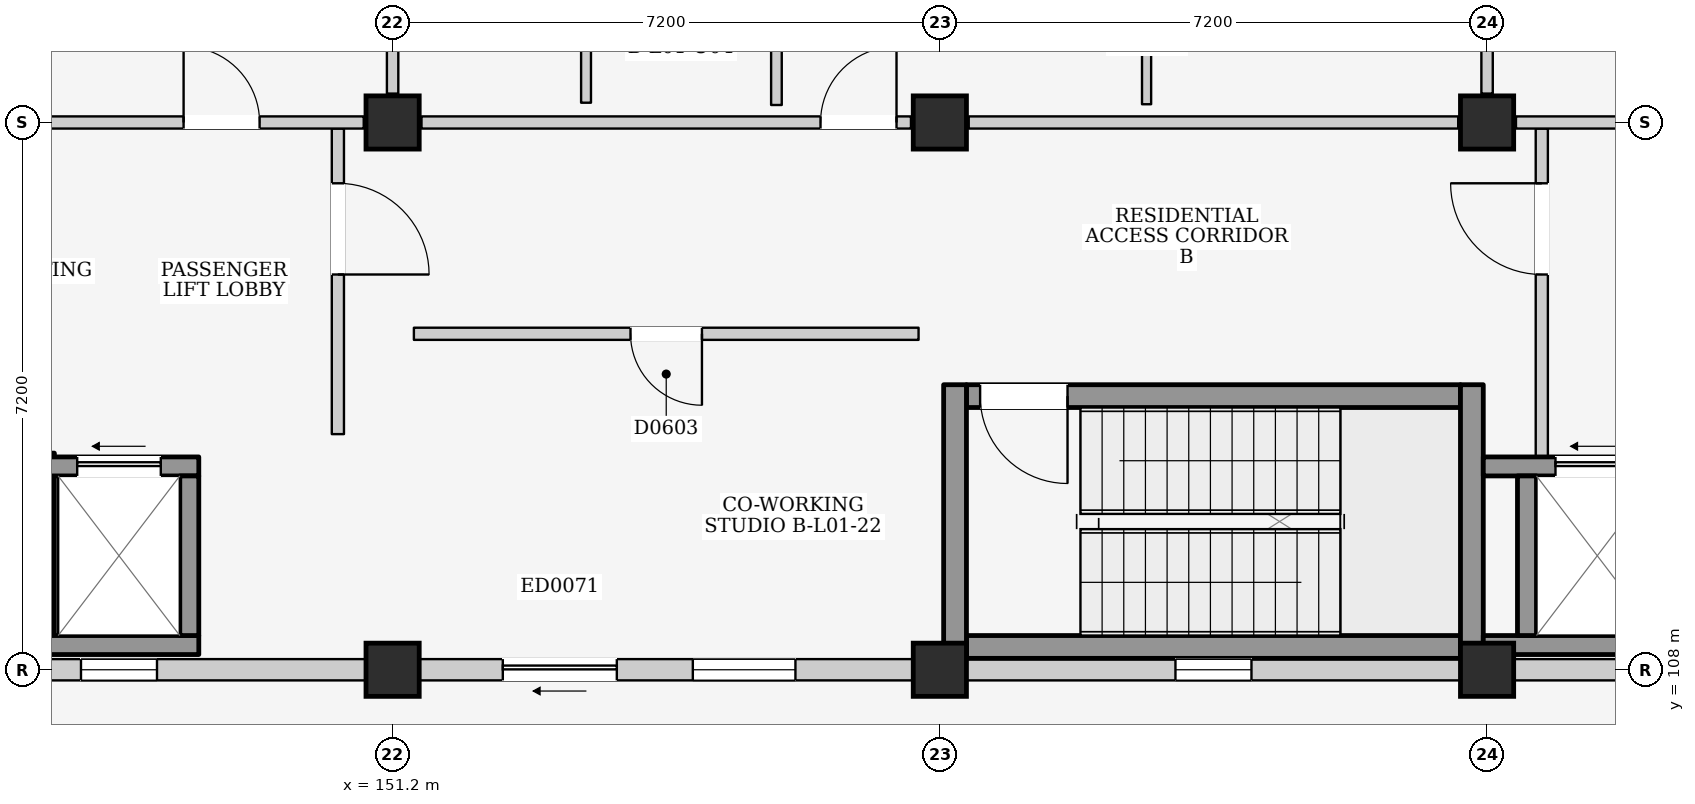
"""IFC4 building model, lengths in metres.
Left out: names, types, materials, properties, quantities, classifications, styles, units other than length and angle.
Written with IfcOpenShell. Run it as: python <this file> out.ifc"""

import sys

from ifc_helpers import new_model, si_unit, direction, frame, frame_2d, origin, origin_2d, place, context, subcontext, project, spatial, rectangle, extrude, element, fill, save


model = new_model("IFC4")
c1 = context("Model", 3, precision=1e-05, world=origin(), true_north=direction((0.0, 1.0)))
c2 = subcontext(c1, "Body", "Model", "MODEL_VIEW")
j1 = project(units=[si_unit("LENGTHUNIT", "METRE"), si_unit("PLANEANGLEUNIT", "RADIAN")], contexts=[c1])
p1 = place(None, origin())
s1 = spatial("IfcSite", under=j1, at=p1, CompositionType="ELEMENT")
p2 = place(p1, origin())
s2 = spatial("IfcBuilding", under=s1, at=p2, CompositionType="ELEMENT")
p3 = place(p2, frame((0.0, 0.0, 4.5)))
s3 = spatial("IfcBuildingStorey", under=s2, at=p3, CompositionType="ELEMENT", Elevation=4.5)
for number, where, z_axis, x_axis in (
    (1, (151.2, 108.0, 0.0), (0.0, 0.0, 1.0), (1.0, 0.0, 0.0)),
    (2, (151.2, 115.2, 0.0), (0.0, 0.0, 1.0), (1.0, 0.0, 0.0)),
    (3, (158.4, 108.0, 0.0), (0.0, 0.0, 1.0), (1.0, 0.0, 0.0)),
    (4, (158.4, 115.2, 0.0), (0.0, 0.0, 1.0), (1.0, 0.0, 0.0)),
    (5, (165.6, 108.0, 0.0), (0.0, 0.0, 1.0), (1.0, 0.0, 0.0)),
    (6, (165.6, 115.2, 0.0), (0.0, 0.0, 1.0), (1.0, 0.0, 0.0)),
):
    element("IfcColumn", number, at=place(p3, frame(where, z_axis=z_axis, x_axis=x_axis)), inside=s3, PredefinedType="COLUMN", context=c2, shape_type="SweptSolid", body=[
        extrude(rectangle(XDim=0.7, YDim=0.7, at=origin_2d()), origin(), (0.0, 0.0, 1.0), 4.5),
    ])
p4 = place(p3, frame((144.35, 108.0, 0.0), z_axis=(0.0, 0.0, 1.0), x_axis=(1.0, 0.0, 0.0)))
e7 = element("IfcWall", 7, at=p4, inside=s3, PredefinedType="ELEMENTEDWALL", context=c2, shape_type="SweptSolid", body=[
    extrude(rectangle(XDim=6.5, YDim=0.28, at=frame_2d((3.25, 0.0))), origin(), (0.0, 0.0, 1.0), 3.635),
])
p5 = place(p4, frame((2.75, 0.0, 1.2)))
e8 = element("IfcOpeningElement", 8, at=p5, cuts=e7, PredefinedType="OPENING", context=c2, shape_type="SweptSolid", body=[
    extrude(rectangle(XDim=1.0, YDim=0.9, at=frame_2d((0.5, 0.45))), frame((0.0, 0.155, 0.0), z_axis=(0.0, -1.0, 0.0), x_axis=(1.0, 0.0, 0.0)), (0.0, 0.0, 1.0), 0.31),
])
p6 = place(p3, frame((151.55, 108.0, 0.0), z_axis=(0.0, 0.0, 1.0), x_axis=(1.0, 0.0, 0.0)))
e9 = element("IfcWall", 9, at=p6, inside=s3, PredefinedType="ELEMENTEDWALL", context=c2, shape_type="SweptSolid", body=[
    extrude(rectangle(XDim=6.5, YDim=0.28, at=frame_2d((3.25, 0.0))), origin(), (0.0, 0.0, 1.0), 3.635),
])
p7 = place(p6, frame((1.1, 0.0, 0.0)))
e10 = element("IfcOpeningElement", 10, at=p7, cuts=e9, PredefinedType="OPENING", context=c2, shape_type="SweptSolid", body=[
    extrude(rectangle(XDim=1.5, YDim=2.12, at=frame_2d((0.75, 1.06))), frame((0.0, 0.155, 0.0), z_axis=(0.0, -1.0, 0.0), x_axis=(1.0, 0.0, 0.0)), (0.0, 0.0, 1.0), 0.31),
])
p8 = place(p6, frame((3.6, 0.0, 0.95)))
e11 = element("IfcOpeningElement", 11, at=p8, cuts=e9, PredefinedType="OPENING", context=c2, shape_type="SweptSolid", body=[
    extrude(rectangle(XDim=1.35, YDim=1.5, at=frame_2d((0.675, 0.75))), frame((0.0, 0.155, 0.0), z_axis=(0.0, -1.0, 0.0), x_axis=(1.0, 0.0, 0.0)), (0.0, 0.0, 1.0), 0.31),
])
p9 = place(p3, frame((158.75, 108.0, 0.0), z_axis=(0.0, 0.0, 1.0), x_axis=(1.0, 0.0, 0.0)))
e12 = element("IfcWall", 12, at=p9, inside=s3, PredefinedType="ELEMENTEDWALL", context=c2, shape_type="SweptSolid", body=[
    extrude(rectangle(XDim=6.5, YDim=0.28, at=frame_2d((3.25, 0.0))), origin(), (0.0, 0.0, 1.0), 3.635),
])
p10 = place(p9, frame((2.75, 0.0, 1.2)))
e13 = element("IfcOpeningElement", 13, at=p10, cuts=e12, PredefinedType="OPENING", context=c2, shape_type="SweptSolid", body=[
    extrude(rectangle(XDim=1.0, YDim=0.9, at=frame_2d((0.5, 0.45))), frame((0.0, 0.155, 0.0), z_axis=(0.0, -1.0, 0.0), x_axis=(1.0, 0.0, 0.0)), (0.0, 0.0, 1.0), 0.31),
])
p11 = place(p3, frame((165.95, 108.0, 0.0), z_axis=(0.0, 0.0, 1.0), x_axis=(1.0, 0.0, 0.0)))
e14 = element("IfcWall", 14, at=p11, inside=s3, PredefinedType="ELEMENTEDWALL", context=c2, shape_type="SweptSolid", body=[
    extrude(rectangle(XDim=6.5, YDim=0.28, at=frame_2d((3.25, 0.0))), origin(), (0.0, 0.0, 1.0), 3.635),
])
p12 = place(p11, frame((2.75, 0.0, 1.2)))
e15 = element("IfcOpeningElement", 15, at=p12, cuts=e14, PredefinedType="OPENING", context=c2, shape_type="SweptSolid", body=[
    extrude(rectangle(XDim=1.0, YDim=0.9, at=frame_2d((0.5, 0.45))), frame((0.0, 0.155, 0.0), z_axis=(0.0, -1.0, 0.0), x_axis=(1.0, 0.0, 0.0)), (0.0, 0.0, 1.0), 0.31),
])
p13 = place(p3, frame((150.48, 111.1, 0.0), z_axis=(0.0, 0.0, 1.0), x_axis=(0.0, 1.0, 0.0)))
e16 = element("IfcWall", 16, at=p13, inside=s3, PredefinedType="PARTITIONING", context=c2, shape_type="SweptSolid", body=[
    extrude(rectangle(XDim=4.02, YDim=0.16, at=frame_2d((2.01, 0.0))), origin(), (0.0, 0.0, 1.0), 4.25),
])
p14 = place(p13, frame((2.1, 0.0, 0.0)))
e17 = element("IfcOpeningElement", 17, at=p14, cuts=e16, PredefinedType="OPENING", context=c2, shape_type="SweptSolid", body=[
    extrude(rectangle(XDim=1.2, YDim=2.2, at=frame_2d((0.6, 1.1))), frame((0.0, 0.095, 0.0), z_axis=(0.0, -1.0, 0.0), x_axis=(1.0, 0.0, 0.0)), (0.0, 0.0, 1.0), 0.19),
])
p15 = place(p3, frame((146.625, 108.45, 0.0), z_axis=(0.0, 0.0, 1.0), x_axis=(0.0, 1.0, 0.0)))
e18 = element("IfcWall", 18, at=p15, inside=s3, PredefinedType="SHEAR", context=c2, shape_type="SweptSolid", body=[
    extrude(rectangle(XDim=2.4, YDim=0.25, at=frame_2d((1.2, 0.0))), origin(), (0.0, 0.0, 1.0), 4.25),
])
p16 = place(p3, frame((146.625, 108.325, 0.0), z_axis=(0.0, 0.0, 1.0), x_axis=(1.0, 0.0, 0.0)))
e19 = element("IfcWall", 19, at=p16, inside=s3, PredefinedType="SHEAR", context=c2, shape_type="SweptSolid", body=[
    extrude(rectangle(XDim=2.025, YDim=0.25, at=frame_2d((1.012, 0.0))), origin(), (0.0, 0.0, 1.0), 4.25),
])
p17 = place(p3, frame((146.625, 110.675, 0.0), z_axis=(0.0, 0.0, 1.0), x_axis=(1.0, 0.0, 0.0)))
e20 = element("IfcWall", 20, at=p17, inside=s3, PredefinedType="SHEAR", context=c2, shape_type="SweptSolid", body=[
    extrude(rectangle(XDim=2.025, YDim=0.25, at=frame_2d((1.012, 0.0))), origin(), (0.0, 0.0, 1.0), 4.25),
])
p18 = place(p17, frame((0.425, 0.0, 0.0)))
e21 = element("IfcOpeningElement", 21, at=p18, cuts=e20, PredefinedType="OPENING", context=c2, shape_type="SweptSolid", body=[
    extrude(rectangle(XDim=1.1, YDim=2.15, at=frame_2d((0.55, 1.075))), frame((0.0, 0.14, 0.0), z_axis=(0.0, -1.0, 0.0), x_axis=(1.0, 0.0, 0.0)), (0.0, 0.0, 1.0), 0.28),
])
p19 = place(p3, frame((148.525, 108.45, 0.0), z_axis=(0.0, 0.0, 1.0), x_axis=(0.0, 1.0, 0.0)))
e22 = element("IfcWall", 22, at=p19, inside=s3, PredefinedType="SHEAR", context=c2, shape_type="SweptSolid", body=[
    extrude(rectangle(XDim=2.1, YDim=0.25, at=frame_2d((1.05, 0.0))), origin(), (0.0, 0.0, 1.0), 4.25),
])
p20 = place(p3, frame((158.75, 108.3, 0.0), z_axis=(0.0, 0.0, 1.0), x_axis=(1.0, 0.0, 0.0)))
e23 = element("IfcWall", 23, at=p20, inside=s3, PredefinedType="SHEAR", context=c2, shape_type="SweptSolid", body=[
    extrude(rectangle(XDim=6.5, YDim=0.3, at=frame_2d((3.25, 0.0))), origin(), (0.0, 0.0, 1.0), 4.25),
])
p21 = place(p3, frame((158.75, 111.6, 0.0), z_axis=(0.0, 0.0, 1.0), x_axis=(1.0, 0.0, 0.0)))
e24 = element("IfcWall", 24, at=p21, inside=s3, PredefinedType="SHEAR", context=c2, shape_type="SweptSolid", body=[
    extrude(rectangle(XDim=6.5, YDim=0.3, at=frame_2d((3.25, 0.0))), origin(), (0.0, 0.0, 1.0), 4.25),
])
p22 = place(p21, frame((0.18, 0.0, 0.0)))
e25 = element("IfcOpeningElement", 25, at=p22, cuts=e24, PredefinedType="OPENING", context=c2, shape_type="SweptSolid", body=[
    extrude(rectangle(XDim=1.15, YDim=2.2, at=frame_2d((0.575, 1.1))), frame((0.0, 0.165, 0.0), z_axis=(0.0, -1.0, 0.0), x_axis=(1.0, 0.0, 0.0)), (0.0, 0.0, 1.0), 0.33),
])
for number, where, z_axis, x_axis in (
    (26, (158.6, 108.15, 0.0), (0.0, 0.0, 1.0), (0.0, 1.0, 0.0)),
    (27, (165.4, 108.15, 0.0), (0.0, 0.0, 1.0), (0.0, 1.0, 0.0)),
):
    element("IfcWall", number, at=place(p3, frame(where, z_axis=z_axis, x_axis=x_axis)), inside=s3, PredefinedType="SHEAR", context=c2, shape_type="SweptSolid", body=[
        extrude(rectangle(XDim=3.6, YDim=0.3, at=frame_2d((1.8, 0.0))), origin(), (0.0, 0.0, 1.0), 4.25),
    ])
p23 = place(p3, frame((166.32, 110.8, 0.0), z_axis=(0.0, 0.0, 1.0), x_axis=(0.0, 1.0, 0.0)))
e28 = element("IfcWall", 28, at=p23, inside=s3, PredefinedType="PARTITIONING", context=c2, shape_type="SweptSolid", body=[
    extrude(rectangle(XDim=4.32, YDim=0.16, at=frame_2d((2.16, 0.0))), origin(), (0.0, 0.0, 1.0), 4.25),
])
p24 = place(p23, frame((2.4, 0.0, 0.0)))
e29 = element("IfcOpeningElement", 29, at=p24, cuts=e28, PredefinedType="OPENING", context=c2, shape_type="SweptSolid", body=[
    extrude(rectangle(XDim=1.2, YDim=2.2, at=frame_2d((0.6, 1.1))), frame((0.0, 0.095, 0.0), z_axis=(0.0, -1.0, 0.0), x_axis=(1.0, 0.0, 0.0)), (0.0, 0.0, 1.0), 0.19),
])
p25 = place(p3, frame((165.55, 108.325, 0.0), z_axis=(0.0, 0.0, 1.0), x_axis=(1.0, 0.0, 0.0)))
e30 = element("IfcWall", 30, at=p25, inside=s3, PredefinedType="SHEAR", context=c2, shape_type="SweptSolid", body=[
    extrude(rectangle(XDim=2.55, YDim=0.25, at=frame_2d((1.275, 0.0))), origin(), (0.0, 0.0, 1.0), 4.25),
])
p26 = place(p3, frame((165.55, 110.675, 0.0), z_axis=(0.0, 0.0, 1.0), x_axis=(1.0, 0.0, 0.0)))
e31 = element("IfcWall", 31, at=p26, inside=s3, PredefinedType="SHEAR", context=c2, shape_type="SweptSolid", body=[
    extrude(rectangle(XDim=2.55, YDim=0.25, at=frame_2d((1.275, 0.0))), origin(), (0.0, 0.0, 1.0), 4.25),
])
p27 = place(p26, frame((0.95, 0.0, 0.0)))
e32 = element("IfcOpeningElement", 32, at=p27, cuts=e31, PredefinedType="OPENING", context=c2, shape_type="SweptSolid", body=[
    extrude(rectangle(XDim=1.1, YDim=2.15, at=frame_2d((0.55, 1.075))), frame((0.0, 0.14, 0.0), z_axis=(0.0, -1.0, 0.0), x_axis=(1.0, 0.0, 0.0)), (0.0, 0.0, 1.0), 0.28),
])
p28 = place(p3, frame((166.125, 108.45, 0.0), z_axis=(0.0, 0.0, 1.0), x_axis=(0.0, 1.0, 0.0)))
e33 = element("IfcWall", 33, at=p28, inside=s3, PredefinedType="SHEAR", context=c2, shape_type="SweptSolid", body=[
    extrude(rectangle(XDim=2.1, YDim=0.25, at=frame_2d((1.05, 0.0))), origin(), (0.0, 0.0, 1.0), 4.25),
])
p29 = place(p3, frame((144.38, 115.2, 0.0), z_axis=(0.0, 0.0, 1.0), x_axis=(1.0, 0.0, 0.0)))
e34 = element("IfcWall", 34, at=p29, inside=s3, PredefinedType="PARTITIONING", context=c2, shape_type="SweptSolid", body=[
    extrude(rectangle(XDim=6.44, YDim=0.16, at=frame_2d((3.22, 0.0))), origin(), (0.0, 0.0, 1.0), 3.635),
])
p30 = place(p29, frame((4.07, 0.0, 0.0)))
e35 = element("IfcOpeningElement", 35, at=p30, cuts=e34, PredefinedType="OPENING", context=c2, shape_type="SweptSolid", body=[
    extrude(rectangle(XDim=1.0, YDim=2.15, at=frame_2d((0.5, 1.075))), frame((0.0, 0.095, 0.0), z_axis=(0.0, -1.0, 0.0), x_axis=(1.0, 0.0, 0.0)), (0.0, 0.0, 1.0), 0.19),
])
p31 = place(p3, frame((151.2, 115.58, 0.0), z_axis=(0.0, 0.0, 1.0), x_axis=(0.0, 1.0, 0.0)))
e36 = element("IfcWall", 36, at=p31, inside=s3, PredefinedType="PARTITIONING", context=c2, shape_type="SweptSolid", body=[
    extrude(rectangle(XDim=6.44, YDim=0.15, at=frame_2d((3.22, 0.0))), origin(), (0.0, 0.0, 1.0), 3.685),
])
p32 = place(p3, frame((151.58, 115.2, 0.0), z_axis=(0.0, 0.0, 1.0), x_axis=(1.0, 0.0, 0.0)))
e37 = element("IfcWall", 37, at=p32, inside=s3, PredefinedType="PARTITIONING", context=c2, shape_type="SweptSolid", body=[
    extrude(rectangle(XDim=6.44, YDim=0.16, at=frame_2d((3.22, 0.0))), origin(), (0.0, 0.0, 1.0), 3.635),
])
p33 = place(p32, frame((5.25, 0.0, 0.0)))
e38 = element("IfcOpeningElement", 38, at=p33, cuts=e37, PredefinedType="OPENING", context=c2, shape_type="SweptSolid", body=[
    extrude(rectangle(XDim=1.0, YDim=2.15, at=frame_2d((0.5, 1.075))), frame((0.0, 0.095, 0.0), z_axis=(0.0, -1.0, 0.0), x_axis=(1.0, 0.0, 0.0)), (0.0, 0.0, 1.0), 0.19),
])
p34 = place(p3, frame((158.78, 115.2, 0.0), z_axis=(0.0, 0.0, 1.0), x_axis=(1.0, 0.0, 0.0)))
e39 = element("IfcWall", 39, at=p34, inside=s3, PredefinedType="PARTITIONING", context=c2, shape_type="SweptSolid", body=[
    extrude(rectangle(XDim=6.44, YDim=0.16, at=frame_2d((3.22, 0.0))), origin(), (0.0, 0.0, 1.0), 3.635),
])
p35 = place(p3, frame((165.6, 115.58, 0.0), z_axis=(0.0, 0.0, 1.0), x_axis=(0.0, 1.0, 0.0)))
e40 = element("IfcWall", 40, at=p35, inside=s3, PredefinedType="PARTITIONING", context=c2, shape_type="SweptSolid", body=[
    extrude(rectangle(XDim=6.44, YDim=0.15, at=frame_2d((3.22, 0.0))), origin(), (0.0, 0.0, 1.0), 3.685),
])
p36 = place(p3, frame((153.745, 115.46, 0.0), z_axis=(0.0, 0.0, 1.0), x_axis=(0.0, 1.0, 0.0)))
e41 = element("IfcWall", 41, at=p36, inside=s3, PredefinedType="PARTITIONING", context=c2, shape_type="SweptSolid", body=[
    extrude(rectangle(XDim=3.04, YDim=0.13, at=frame_2d((1.52, 0.0))), origin(), (0.0, 0.0, 1.0), 4.25),
])
p37 = place(p3, frame((156.25, 115.43, 0.0), z_axis=(0.0, 0.0, 1.0), x_axis=(0.0, 1.0, 0.0)))
e42 = element("IfcWall", 42, at=p37, inside=s3, PredefinedType="PARTITIONING", context=c2, shape_type="SweptSolid", body=[
    extrude(rectangle(XDim=3.06, YDim=0.14, at=frame_2d((1.53, 0.0))), origin(), (0.0, 0.0, 1.0), 4.25),
])
p38 = place(p3, frame((161.12, 115.44, 0.0), z_axis=(0.0, 0.0, 1.0), x_axis=(0.0, 1.0, 0.0)))
e43 = element("IfcWall", 43, at=p38, inside=s3, PredefinedType="PARTITIONING", context=c2, shape_type="SweptSolid", body=[
    extrude(rectangle(XDim=3.04, YDim=0.12, at=frame_2d((1.52, 0.0))), origin(), (0.0, 0.0, 1.0), 4.25),
])
p39 = place(p38, frame((1.04, 0.0, 0.0)))
e44 = element("IfcOpeningElement", 44, at=p39, cuts=e43, PredefinedType="OPENING", context=c2, shape_type="SweptSolid", body=[
    extrude(rectangle(XDim=0.96, YDim=2.15, at=frame_2d((0.48, 1.075))), frame((0.0, 0.075, 0.0), z_axis=(0.0, -1.0, 0.0), x_axis=(1.0, 0.0, 0.0)), (0.0, 0.0, 1.0), 0.15),
])
p40 = place(p3, frame((165.98, 115.2, 0.0), z_axis=(0.0, 0.0, 1.0), x_axis=(1.0, 0.0, 0.0)))
e45 = element("IfcWall", 45, at=p40, inside=s3, PredefinedType="PARTITIONING", context=c2, shape_type="SweptSolid", body=[
    extrude(rectangle(XDim=6.44, YDim=0.16, at=frame_2d((3.22, 0.0))), origin(), (0.0, 0.0, 1.0), 3.635),
])
p41 = place(p40, frame((4.07, 0.0, 0.0)))
e46 = element("IfcOpeningElement", 46, at=p41, cuts=e45, PredefinedType="OPENING", context=c2, shape_type="SweptSolid", body=[
    extrude(rectangle(XDim=1.0, YDim=2.15, at=frame_2d((0.5, 1.075))), frame((0.0, 0.095, 0.0), z_axis=(0.0, -1.0, 0.0), x_axis=(1.0, 0.0, 0.0)), (0.0, 0.0, 1.0), 0.19),
])
p42 = place(p3, frame((151.48, 112.42, 0.0), z_axis=(0.0, 0.0, 1.0), x_axis=(1.0, 0.0, 0.0)))
e47 = element("IfcWall", 47, at=p42, inside=s3, PredefinedType="PARTITIONING", context=c2, shape_type="SweptSolid", body=[
    extrude(rectangle(XDim=6.64, YDim=0.16, at=frame_2d((3.32, 0.0))), origin(), (0.0, 0.0, 1.0), 4.25),
])
p43 = place(p42, frame((2.85, 0.0, 0.0)))
e48 = element("IfcOpeningElement", 48, at=p43, cuts=e47, PredefinedType="OPENING", context=c2, shape_type="SweptSolid", body=[
    extrude(rectangle(XDim=0.94, YDim=2.12, at=frame_2d((0.47, 1.06))), frame((0.0, 0.095, 0.0), z_axis=(0.0, -1.0, 0.0), x_axis=(1.0, 0.0, 0.0)), (0.0, 0.0, 1.0), 0.19),
])
p44 = place(p5, origin())
e49 = element("IfcWindow", 49, at=p44, inside=s3, PartitioningType="SINGLE_PANEL", PredefinedType="WINDOW", context=c2, shape_type="SweptSolid", body=[
    extrude(rectangle(XDim=1.0, YDim=0.9, at=frame_2d((0.5, 0.45))), frame((0.0, 0.03, 0.0), z_axis=(0.0, -1.0, 0.0), x_axis=(1.0, 0.0, 0.0)), (0.0, 0.0, 1.0), 0.06),
])
fill(e8, e49)
p45 = place(p7, frame((1.5, 0.0, 0.0), z_axis=(0.0, 0.0, 1.0), x_axis=(-1.0, 0.0, 0.0)))
e50 = element("IfcDoor", 50, at=p45, inside=s3, OperationType="SLIDING_TO_LEFT", PredefinedType="DOOR", context=c2, shape_type="SweptSolid", body=[
    extrude(rectangle(XDim=1.5, YDim=2.12, at=frame_2d((0.75, 1.06))), frame((0.0, 0.025, 0.0), z_axis=(0.0, -1.0, 0.0), x_axis=(1.0, 0.0, 0.0)), (0.0, 0.0, 1.0), 0.05),
])
fill(e10, e50)
p46 = place(p8, origin())
e51 = element("IfcWindow", 51, at=p46, inside=s3, PartitioningType="SINGLE_PANEL", PredefinedType="WINDOW", context=c2, shape_type="SweptSolid", body=[
    extrude(rectangle(XDim=1.35, YDim=1.5, at=frame_2d((0.675, 0.75))), frame((0.0, 0.03, 0.0), z_axis=(0.0, -1.0, 0.0), x_axis=(1.0, 0.0, 0.0)), (0.0, 0.0, 1.0), 0.06),
])
fill(e11, e51)
p47 = place(p10, origin())
e52 = element("IfcWindow", 52, at=p47, inside=s3, PartitioningType="SINGLE_PANEL", PredefinedType="WINDOW", context=c2, shape_type="SweptSolid", body=[
    extrude(rectangle(XDim=1.0, YDim=0.9, at=frame_2d((0.5, 0.45))), frame((0.0, 0.03, 0.0), z_axis=(0.0, -1.0, 0.0), x_axis=(1.0, 0.0, 0.0)), (0.0, 0.0, 1.0), 0.06),
])
fill(e13, e52)
p48 = place(p14, frame((1.2, 0.0, 0.0), z_axis=(0.0, 0.0, 1.0), x_axis=(-1.0, 0.0, 0.0)))
e53 = element("IfcDoor", 53, at=p48, inside=s3, OperationType="SINGLE_SWING_RIGHT", PredefinedType="DOOR", context=c2, shape_type="SweptSolid", body=[
    extrude(rectangle(XDim=1.2, YDim=2.2, at=frame_2d((0.6, 1.1))), frame((0.0, 0.025, 0.0), z_axis=(0.0, -1.0, 0.0), x_axis=(1.0, 0.0, 0.0)), (0.0, 0.0, 1.0), 0.05),
])
fill(e17, e53)
p49 = place(p18, origin())
e54 = element("IfcDoor", 54, at=p49, inside=s3, OperationType="SLIDING_TO_LEFT", PredefinedType="DOOR", context=c2, shape_type="SweptSolid", body=[
    extrude(rectangle(XDim=1.1, YDim=2.15, at=frame_2d((0.55, 1.075))), frame((0.0, 0.025, 0.0), z_axis=(0.0, -1.0, 0.0), x_axis=(1.0, 0.0, 0.0)), (0.0, 0.0, 1.0), 0.05),
])
fill(e21, e54)
p50 = place(p22, frame((1.15, 0.0, 0.0), z_axis=(0.0, 0.0, 1.0), x_axis=(-1.0, 0.0, 0.0)))
e55 = element("IfcDoor", 55, at=p50, inside=s3, OperationType="SINGLE_SWING_LEFT", PredefinedType="DOOR", context=c2, shape_type="SweptSolid", body=[
    extrude(rectangle(XDim=1.15, YDim=2.2, at=frame_2d((0.575, 1.1))), frame((0.0, 0.025, 0.0), z_axis=(0.0, -1.0, 0.0), x_axis=(1.0, 0.0, 0.0)), (0.0, 0.0, 1.0), 0.05),
])
fill(e25, e55)
p51 = place(p24, origin())
e56 = element("IfcDoor", 56, at=p51, inside=s3, OperationType="SINGLE_SWING_RIGHT", PredefinedType="DOOR", context=c2, shape_type="SweptSolid", body=[
    extrude(rectangle(XDim=1.2, YDim=2.2, at=frame_2d((0.6, 1.1))), frame((0.0, 0.025, 0.0), z_axis=(0.0, -1.0, 0.0), x_axis=(1.0, 0.0, 0.0)), (0.0, 0.0, 1.0), 0.05),
])
fill(e29, e56)
p52 = place(p27, origin())
e57 = element("IfcDoor", 57, at=p52, inside=s3, OperationType="SLIDING_TO_LEFT", PredefinedType="DOOR", context=c2, shape_type="SweptSolid", body=[
    extrude(rectangle(XDim=1.1, YDim=2.15, at=frame_2d((0.55, 1.075))), frame((0.0, 0.025, 0.0), z_axis=(0.0, -1.0, 0.0), x_axis=(1.0, 0.0, 0.0)), (0.0, 0.0, 1.0), 0.05),
])
fill(e32, e57)
p53 = place(p30, origin())
e58 = element("IfcDoor", 58, at=p53, inside=s3, OperationType="SINGLE_SWING_LEFT", PredefinedType="DOOR", context=c2, shape_type="SweptSolid", body=[
    extrude(rectangle(XDim=1.0, YDim=2.15, at=frame_2d((0.5, 1.075))), frame((0.0, 0.025, 0.0), z_axis=(0.0, -1.0, 0.0), x_axis=(1.0, 0.0, 0.0)), (0.0, 0.0, 1.0), 0.05),
])
fill(e35, e58)
p54 = place(p33, origin())
e59 = element("IfcDoor", 59, at=p54, inside=s3, OperationType="SINGLE_SWING_RIGHT", PredefinedType="DOOR", context=c2, shape_type="SweptSolid", body=[
    extrude(rectangle(XDim=1.0, YDim=2.15, at=frame_2d((0.5, 1.075))), frame((0.0, 0.025, 0.0), z_axis=(0.0, -1.0, 0.0), x_axis=(1.0, 0.0, 0.0)), (0.0, 0.0, 1.0), 0.05),
])
fill(e38, e59)
p55 = place(p43, frame((0.94, 0.0, 0.0), z_axis=(0.0, 0.0, 1.0), x_axis=(-1.0, 0.0, 0.0)))
e60 = element("IfcDoor", 60, at=p55, inside=s3, OperationType="SINGLE_SWING_LEFT", PredefinedType="DOOR", context=c2, shape_type="SweptSolid", body=[
    extrude(rectangle(XDim=0.94, YDim=2.12, at=frame_2d((0.47, 1.06))), frame((0.0, 0.025, 0.0), z_axis=(0.0, -1.0, 0.0), x_axis=(1.0, 0.0, 0.0)), (0.0, 0.0, 1.0), 0.05),
])
fill(e48, e60)
save(model, sys.argv[1])
